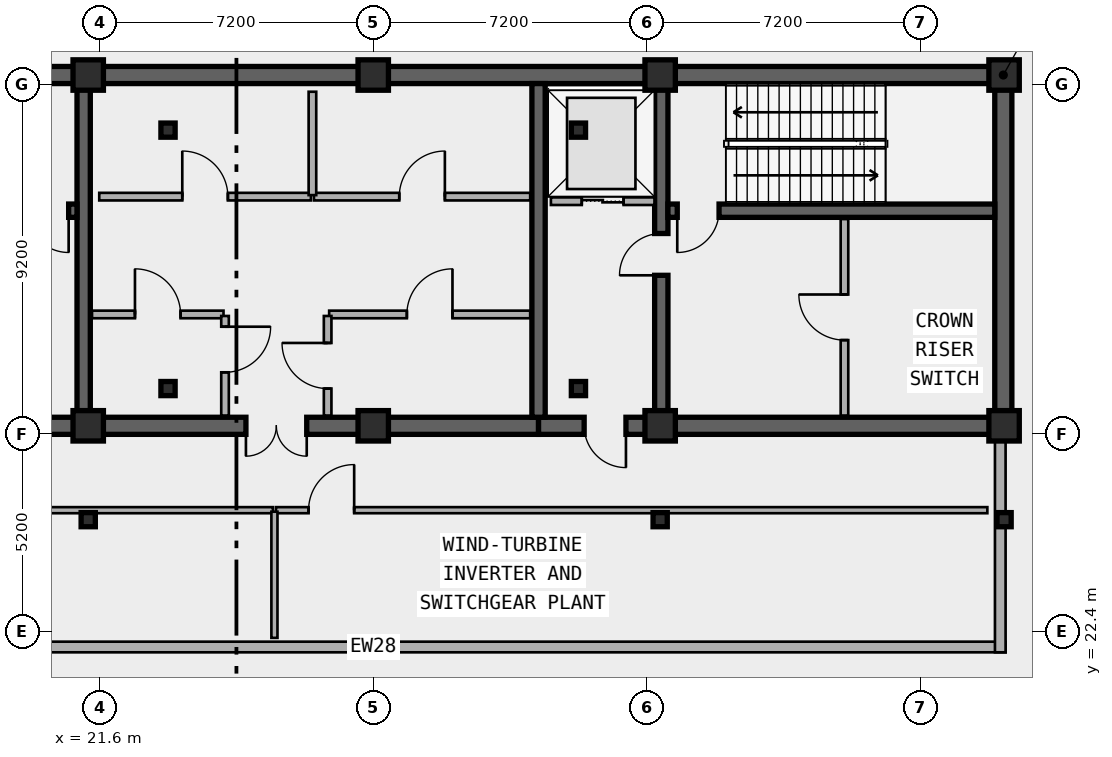
"""IFC4 building model, lengths in metres.
Left out: names, types, materials, properties, quantities, classifications, styles, units other than length and angle.
Written with IfcOpenShell. Run it as: python <this file> out.ifc"""

import sys

from ifc_helpers import new_model, si_unit, direction, frame, frame_2d, origin, origin_2d, place, context, subcontext, project, spatial, rectangle, i_section, extrude, element, fill, save


model = new_model("IFC4")
c1 = context("Model", 3, precision=1e-05, world=origin(), true_north=direction((0.0, 1.0)))
c2 = subcontext(c1, "Body", "Model", "MODEL_VIEW")
j1 = project(units=[si_unit("LENGTHUNIT", "METRE"), si_unit("PLANEANGLEUNIT", "RADIAN")], contexts=[c1])
p1 = place(None, origin())
s1 = spatial("IfcSite", under=j1, at=p1, CompositionType="ELEMENT")
p2 = place(p1, origin())
s2 = spatial("IfcBuilding", under=s1, at=p2, CompositionType="ELEMENT")
p3 = place(p2, frame((0.0, 0.0, 280.6)))
s3 = spatial("IfcBuildingStorey", under=s2, at=p3, CompositionType="ELEMENT", Elevation=280.6)
p4 = place(p3, frame((12.15, 37.05, 0.0), z_axis=(0.0, 0.0, 1.0), x_axis=(1.0, 0.0, 0.0)))
e1 = element("IfcWall", 1, at=p4, inside=s3, PredefinedType="SHEAR", context=c2, shape_type="SweptSolid", body=[
    extrude(rectangle(XDim=33.23, YDim=0.45, at=frame_2d((16.615, 0.0))), origin(), (0.0, 0.0, 1.0), 6.0),
])
p5 = place(p3, frame((21.18, 27.82, 0.0), z_axis=(0.0, 0.0, 1.0), x_axis=(-1.0, 0.0, 0.0)))
e2 = element("IfcWall", 2, at=p5, inside=s3, PredefinedType="SHEAR", context=c2, shape_type="SweptSolid", body=[
    extrude(rectangle(XDim=9.03, YDim=0.45, at=frame_2d((4.515, 0.0))), origin(), (0.0, 0.0, 1.0), 6.0),
])
p6 = place(p5, frame((2.68, 0.0, 0.0)))
e3 = element("IfcOpeningElement", 3, at=p6, cuts=e2, PredefinedType="OPENING", context=c2, shape_type="SweptSolid", body=[
    extrude(rectangle(XDim=1.1, YDim=2.15, at=frame_2d((0.55, 1.075))), frame((0.0, 0.235, 0.0), z_axis=(0.0, -1.0, 0.0), x_axis=(1.0, 0.0, 0.0)), (0.0, 0.0, 1.0), 0.47),
])
p7 = place(p3, frame((33.15, 27.82, 0.0), z_axis=(0.0, 0.0, 1.0), x_axis=(-1.0, 0.0, 0.0)))
e4 = element("IfcWall", 4, at=p7, inside=s3, PredefinedType="SHEAR", context=c2, shape_type="SweptSolid", body=[
    extrude(rectangle(XDim=11.97, YDim=0.45, at=frame_2d((5.985, 0.0))), origin(), (0.0, 0.0, 1.0), 6.0),
])
p8 = place(p7, frame((6.1, 0.0, 0.0)))
e5 = element("IfcOpeningElement", 5, at=p8, cuts=e4, PredefinedType="OPENING", context=c2, shape_type="SweptSolid", body=[
    extrude(rectangle(XDim=1.6, YDim=2.2, at=frame_2d((0.8, 1.1))), frame((0.0, 0.235, 0.0), z_axis=(0.0, -1.0, 0.0), x_axis=(1.0, 0.0, 0.0)), (0.0, 0.0, 1.0), 0.47),
])
p9 = place(p3, frame((45.38, 27.82, 0.0), z_axis=(0.0, 0.0, 1.0), x_axis=(-1.0, 0.0, 0.0)))
e6 = element("IfcWall", 6, at=p9, inside=s3, PredefinedType="SHEAR", context=c2, shape_type="SweptSolid", body=[
    extrude(rectangle(XDim=12.23, YDim=0.45, at=frame_2d((6.115, 0.0))), origin(), (0.0, 0.0, 1.0), 6.0),
])
p10 = place(p9, frame((9.93, 0.0, 0.0)))
e7 = element("IfcOpeningElement", 7, at=p10, cuts=e6, PredefinedType="OPENING", context=c2, shape_type="SweptSolid", body=[
    extrude(rectangle(XDim=1.1, YDim=2.15, at=frame_2d((0.55, 1.075))), frame((0.0, 0.235, 0.0), z_axis=(0.0, -1.0, 0.0), x_axis=(1.0, 0.0, 0.0)), (0.0, 0.0, 1.0), 0.47),
])
p11 = place(p3, frame((45.38, 28.045, 0.0), z_axis=(0.0, 0.0, 1.0), x_axis=(0.0, 1.0, 0.0)))
e8 = element("IfcWall", 8, at=p11, inside=s3, PredefinedType="SHEAR", context=c2, shape_type="SweptSolid", body=[
    extrude(rectangle(XDim=8.78, YDim=0.45, at=frame_2d((4.39, 0.0))), origin(), (0.0, 0.0, 1.0), 6.0),
])
for number, where, z_axis, x_axis in (
    (9, (21.18, 28.045, 0.0), (0.0, 0.0, 1.0), (0.0, 1.0, 0.0)),
    (10, (33.15, 28.045, 0.0), (0.0, 0.0, 1.0), (0.0, 1.0, 0.0)),
):
    element("IfcWall", number, at=place(p3, frame(where, z_axis=z_axis, x_axis=x_axis)), inside=s3, PredefinedType="SHEAR", context=c2, shape_type="SweptSolid", body=[
        extrude(rectangle(XDim=8.78, YDim=0.35, at=frame_2d((4.39, 0.0))), origin(), (0.0, 0.0, 1.0), 6.0),
    ])
p12 = place(p3, frame((36.38, 28.045, 0.0), z_axis=(0.0, 0.0, 1.0), x_axis=(0.0, 1.0, 0.0)))
e11 = element("IfcWall", 11, at=p12, inside=s3, PredefinedType="SHEAR", context=c2, shape_type="SweptSolid", body=[
    extrude(rectangle(XDim=8.78, YDim=0.35, at=frame_2d((4.39, 0.0))), origin(), (0.0, 0.0, 1.0), 6.0),
])
p13 = place(p12, frame((3.735, 0.0, 0.0)))
e12 = element("IfcOpeningElement", 12, at=p13, cuts=e11, PredefinedType="OPENING", context=c2, shape_type="SweptSolid", body=[
    extrude(rectangle(XDim=1.1, YDim=2.15, at=frame_2d((0.55, 1.075))), frame((0.0, 0.185, 0.0), z_axis=(0.0, -1.0, 0.0), x_axis=(1.0, 0.0, 0.0)), (0.0, 0.0, 1.0), 0.37),
])
p14 = place(p3, frame((21.005, 33.48, 0.0), z_axis=(0.0, 0.0, 1.0), x_axis=(-1.0, 0.0, 0.0)))
e13 = element("IfcWall", 13, at=p14, inside=s3, PredefinedType="SHEAR", context=c2, shape_type="SweptSolid", body=[
    extrude(rectangle(XDim=8.63, YDim=0.35, at=frame_2d((4.315, 0.0))), origin(), (0.0, 0.0, 1.0), 6.0),
])
p15 = place(p14, frame((0.22, 0.0, 0.0)))
e14 = element("IfcOpeningElement", 14, at=p15, cuts=e13, PredefinedType="OPENING", context=c2, shape_type="SweptSolid", body=[
    extrude(rectangle(XDim=1.1, YDim=2.15, at=frame_2d((0.55, 1.075))), frame((0.0, 0.185, 0.0), z_axis=(0.0, -1.0, 0.0), x_axis=(1.0, 0.0, 0.0)), (0.0, 0.0, 1.0), 0.37),
])
p16 = place(p3, frame((45.155, 33.48, 0.0), z_axis=(0.0, 0.0, 1.0), x_axis=(-1.0, 0.0, 0.0)))
e15 = element("IfcWall", 15, at=p16, inside=s3, PredefinedType="SHEAR", context=c2, shape_type="SweptSolid", body=[
    extrude(rectangle(XDim=8.6, YDim=0.35, at=frame_2d((4.3, 0.0))), origin(), (0.0, 0.0, 1.0), 6.0),
])
p17 = place(p16, frame((7.255, 0.0, 0.0)))
e16 = element("IfcOpeningElement", 16, at=p17, cuts=e15, PredefinedType="OPENING", context=c2, shape_type="SweptSolid", body=[
    extrude(rectangle(XDim=1.1, YDim=2.15, at=frame_2d((0.55, 1.075))), frame((0.0, 0.185, 0.0), z_axis=(0.0, -1.0, 0.0), x_axis=(1.0, 0.0, 0.0)), (0.0, 0.0, 1.0), 0.37),
])
for number, where, z_axis, x_axis in (
    (17, (23.4, 28.8, 0.0), (0.0, 0.0, 1.0), (1.0, 0.0, 0.0)),
    (18, (34.2, 28.8, 0.0), (0.0, 0.0, 1.0), (1.0, 0.0, 0.0)),
    (19, (34.2, 35.6, 0.0), (0.0, 0.0, 1.0), (1.0, 0.0, 0.0)),
    (20, (23.4, 35.6, 0.0), (0.0, 0.0, 1.0), (1.0, 0.0, 0.0)),
):
    element("IfcColumn", number, at=place(p3, frame(where, z_axis=z_axis, x_axis=x_axis)), inside=s3, PredefinedType="COLUMN", context=c2, shape_type="SweptSolid", body=[
        extrude(i_section(OverallWidth=0.374, OverallDepth=0.372, WebThickness=0.017, FlangeThickness=0.027, FilletRadius=0.015, at=origin_2d()), origin(), (0.0, 0.0, 1.0), 6.0),
    ])
for number, where, z_axis, x_axis in (
    (21, (21.3, 27.82, 0.0), (0.0, 0.0, 1.0), (1.0, 0.0, 0.0)),
    (22, (21.3, 37.05, 0.0), (0.0, 0.0, 1.0), (1.0, 0.0, 0.0)),
    (23, (28.8, 27.82, 0.0), (0.0, 0.0, 1.0), (1.0, 0.0, 0.0)),
    (24, (28.8, 37.05, 0.0), (0.0, 0.0, 1.0), (1.0, 0.0, 0.0)),
    (25, (36.35, 27.82, 0.0), (0.0, 0.0, 1.0), (1.0, 0.0, 0.0)),
    (26, (36.35, 37.05, 0.0), (0.0, 0.0, 1.0), (1.0, 0.0, 0.0)),
    (27, (45.4, 27.82, 0.0), (0.0, 0.0, 1.0), (1.0, 0.0, 0.0)),
    (28, (45.4, 37.05, 0.0), (0.0, 0.0, 1.0), (1.0, 0.0, 0.0)),
):
    element("IfcColumn", number, at=place(p3, frame(where, z_axis=z_axis, x_axis=x_axis)), inside=s3, PredefinedType="COLUMN", context=c2, shape_type="SweptSolid", body=[
        extrude(rectangle(XDim=0.8, YDim=0.8, at=origin_2d()), origin(), (0.0, 0.0, 1.0), 6.0),
    ])
for number, where, z_axis, x_axis in (
    (29, (21.3, 25.35, 0.0), (0.0, 0.0, 1.0), (1.0, 0.0, 0.0)),
    (30, (36.35, 25.35, 0.0), (0.0, 0.0, 1.0), (1.0, 0.0, 0.0)),
    (31, (45.4, 25.35, 0.0), (0.0, 0.0, 1.0), (1.0, 0.0, 0.0)),
):
    element("IfcColumn", number, at=place(p3, frame(where, z_axis=z_axis, x_axis=x_axis)), inside=s3, PredefinedType="COLUMN", context=c2, shape_type="SweptSolid", body=[
        extrude(i_section(OverallWidth=0.374, OverallDepth=0.372, WebThickness=0.017, FlangeThickness=0.027, FilletRadius=0.015, at=origin_2d()), origin(), (0.0, 0.0, 1.0), 6.0),
    ])
p18 = place(p3, frame((45.44, 22.0, 0.0), z_axis=(0.0, 0.0, 1.0), x_axis=(-1.0, 0.0, 0.0)))
e32 = element("IfcWall", 32, at=p18, inside=s3, PredefinedType="SOLIDWALL", context=c2, shape_type="SweptSolid", body=[
    extrude(rectangle(XDim=33.28, YDim=0.28, at=frame_2d((16.64, 0.0))), origin(), (0.0, 0.0, 1.0), 5.7),
])
p19 = place(p18, frame((25.64, 0.0, 0.0)))
e33 = element("IfcOpeningElement", 33, at=p19, cuts=e32, PredefinedType="OPENING", context=c2, shape_type="SweptSolid", body=[
    extrude(rectangle(XDim=1.6, YDim=2.2, at=frame_2d((0.8, 1.1))), frame((0.0, 0.15, 0.0), z_axis=(0.0, -1.0, 0.0), x_axis=(1.0, 0.0, 0.0)), (0.0, 0.0, 1.0), 0.3),
])
p20 = place(p3, frame((45.3, 27.55, 0.0), z_axis=(0.0, 0.0, 1.0), x_axis=(0.0, -1.0, 0.0)))
e34 = element("IfcWall", 34, at=p20, inside=s3, PredefinedType="SOLIDWALL", context=c2, shape_type="SweptSolid", body=[
    extrude(rectangle(XDim=5.69, YDim=0.28, at=frame_2d((2.845, 0.0))), origin(), (0.0, 0.0, 1.0), 5.18),
])
p21 = place(p3, frame((33.475, 33.73, 0.0), z_axis=(0.0, 0.0, 1.0), x_axis=(1.0, 0.0, 0.0)))
e35 = element("IfcWall", 35, at=p21, inside=s3, PredefinedType="PARTITIONING", context=c2, shape_type="SweptSolid", body=[
    extrude(rectangle(XDim=2.725, YDim=0.2, at=frame_2d((1.362, 0.0))), origin(), (0.0, 0.0, 1.0), 4.77),
])
p22 = place(p21, frame((0.812, 0.0, 0.0)))
e36 = element("IfcOpeningElement", 36, at=p22, cuts=e35, PredefinedType="OPENING", context=c2, shape_type="SweptSolid", body=[
    extrude(rectangle(XDim=1.1, YDim=2.15, at=frame_2d((0.55, 1.075))), frame((0.0, 0.11, 0.0), z_axis=(0.0, -1.0, 0.0), x_axis=(1.0, 0.0, 0.0)), (0.0, 0.0, 1.0), 0.22),
])
p23 = place(p3, frame((41.2, 28.09, 0.0), z_axis=(0.0, 0.0, 1.0), x_axis=(0.0, 1.0, 0.0)))
e37 = element("IfcWall", 37, at=p23, inside=s3, PredefinedType="PARTITIONING", context=c2, shape_type="SweptSolid", body=[
    extrude(rectangle(XDim=5.17, YDim=0.2, at=frame_2d((2.585, 0.0))), origin(), (0.0, 0.0, 1.0), 5.7),
])
p24 = place(p23, frame((1.985, 0.0, 0.0)))
e38 = element("IfcOpeningElement", 38, at=p24, cuts=e37, PredefinedType="OPENING", context=c2, shape_type="SweptSolid", body=[
    extrude(rectangle(XDim=1.2, YDim=2.15, at=frame_2d((0.6, 1.075))), frame((0.0, 0.11, 0.0), z_axis=(0.0, -1.0, 0.0), x_axis=(1.0, 0.0, 0.0)), (0.0, 0.0, 1.0), 0.22),
])
p25 = place(p3, frame((21.4, 30.75, 0.0), z_axis=(0.0, 0.0, 1.0), x_axis=(1.0, 0.0, 0.0)))
e39 = element("IfcWall", 39, at=p25, inside=s3, PredefinedType="PARTITIONING", context=c2, shape_type="SweptSolid", body=[
    extrude(rectangle(XDim=3.46, YDim=0.2, at=frame_2d((1.73, 0.0))), origin(), (0.0, 0.0, 1.0), 4.77),
])
p26 = place(p25, frame((1.13, 0.0, 0.0)))
e40 = element("IfcOpeningElement", 40, at=p26, cuts=e39, PredefinedType="OPENING", context=c2, shape_type="SweptSolid", body=[
    extrude(rectangle(XDim=1.2, YDim=2.15, at=frame_2d((0.6, 1.075))), frame((0.0, 0.11, 0.0), z_axis=(0.0, -1.0, 0.0), x_axis=(1.0, 0.0, 0.0)), (0.0, 0.0, 1.0), 0.22),
])
p27 = place(p3, frame((27.64, 30.75, 0.0), z_axis=(0.0, 0.0, 1.0), x_axis=(1.0, 0.0, 0.0)))
e41 = element("IfcWall", 41, at=p27, inside=s3, PredefinedType="PARTITIONING", context=c2, shape_type="SweptSolid", body=[
    extrude(rectangle(XDim=5.29, YDim=0.2, at=frame_2d((2.645, 0.0))), origin(), (0.0, 0.0, 1.0), 4.77),
])
p28 = place(p27, frame((2.045, 0.0, 0.0)))
e42 = element("IfcOpeningElement", 42, at=p28, cuts=e41, PredefinedType="OPENING", context=c2, shape_type="SweptSolid", body=[
    extrude(rectangle(XDim=1.2, YDim=2.15, at=frame_2d((0.6, 1.075))), frame((0.0, 0.11, 0.0), z_axis=(0.0, -1.0, 0.0), x_axis=(1.0, 0.0, 0.0)), (0.0, 0.0, 1.0), 0.22),
])
p29 = place(p3, frame((21.59, 33.85, 0.0), z_axis=(0.0, 0.0, 1.0), x_axis=(1.0, 0.0, 0.0)))
e43 = element("IfcWall", 43, at=p29, inside=s3, PredefinedType="PARTITIONING", context=c2, shape_type="SweptSolid", body=[
    extrude(rectangle(XDim=5.57, YDim=0.2, at=frame_2d((2.785, 0.0))), origin(), (0.0, 0.0, 1.0), 4.77),
])
p30 = place(p29, frame((2.185, 0.0, 0.0)))
e44 = element("IfcOpeningElement", 44, at=p30, cuts=e43, PredefinedType="OPENING", context=c2, shape_type="SweptSolid", body=[
    extrude(rectangle(XDim=1.2, YDim=2.15, at=frame_2d((0.6, 1.075))), frame((0.0, 0.11, 0.0), z_axis=(0.0, -1.0, 0.0), x_axis=(1.0, 0.0, 0.0)), (0.0, 0.0, 1.0), 0.22),
])
p31 = place(p3, frame((27.24, 33.85, 0.0), z_axis=(0.0, 0.0, 1.0), x_axis=(1.0, 0.0, 0.0)))
e45 = element("IfcWall", 45, at=p31, inside=s3, PredefinedType="PARTITIONING", context=c2, shape_type="SweptSolid", body=[
    extrude(rectangle(XDim=5.69, YDim=0.2, at=frame_2d((2.845, 0.0))), origin(), (0.0, 0.0, 1.0), 4.77),
])
p32 = place(p31, frame((2.245, 0.0, 0.0)))
e46 = element("IfcOpeningElement", 46, at=p32, cuts=e45, PredefinedType="OPENING", context=c2, shape_type="SweptSolid", body=[
    extrude(rectangle(XDim=1.2, YDim=2.15, at=frame_2d((0.6, 1.075))), frame((0.0, 0.11, 0.0), z_axis=(0.0, -1.0, 0.0), x_axis=(1.0, 0.0, 0.0)), (0.0, 0.0, 1.0), 0.22),
])
p33 = place(p3, frame((24.9, 30.71, 0.0), z_axis=(0.0, 0.0, 1.0), x_axis=(0.0, -1.0, 0.0)))
e47 = element("IfcWall", 47, at=p33, inside=s3, PredefinedType="PARTITIONING", context=c2, shape_type="SweptSolid", body=[
    extrude(rectangle(XDim=2.62, YDim=0.2, at=frame_2d((1.31, 0.0))), origin(), (0.0, 0.0, 1.0), 5.7),
])
p34 = place(p33, frame((0.282, 0.0, 0.0)))
e48 = element("IfcOpeningElement", 48, at=p34, cuts=e47, PredefinedType="OPENING", context=c2, shape_type="SweptSolid", body=[
    extrude(rectangle(XDim=1.2, YDim=2.15, at=frame_2d((0.6, 1.075))), frame((0.0, 0.11, 0.0), z_axis=(0.0, -1.0, 0.0), x_axis=(1.0, 0.0, 0.0)), (0.0, 0.0, 1.0), 0.22),
])
p35 = place(p3, frame((27.6, 28.09, 0.0), z_axis=(0.0, 0.0, 1.0), x_axis=(0.0, 1.0, 0.0)))
e49 = element("IfcWall", 49, at=p35, inside=s3, PredefinedType="PARTITIONING", context=c2, shape_type="SweptSolid", body=[
    extrude(rectangle(XDim=2.62, YDim=0.2, at=frame_2d((1.31, 0.0))), origin(), (0.0, 0.0, 1.0), 5.7),
])
p36 = place(p35, frame((0.71, 0.0, 0.0)))
e50 = element("IfcOpeningElement", 50, at=p36, cuts=e49, PredefinedType="OPENING", context=c2, shape_type="SweptSolid", body=[
    extrude(rectangle(XDim=1.2, YDim=2.15, at=frame_2d((0.6, 1.075))), frame((0.0, 0.11, 0.0), z_axis=(0.0, -1.0, 0.0), x_axis=(1.0, 0.0, 0.0)), (0.0, 0.0, 1.0), 0.22),
])
p37 = place(p3, frame((27.2, 33.89, 0.0), z_axis=(0.0, 0.0, 1.0), x_axis=(0.0, 1.0, 0.0)))
e51 = element("IfcWall", 51, at=p37, inside=s3, PredefinedType="PARTITIONING", context=c2, shape_type="SweptSolid", body=[
    extrude(rectangle(XDim=2.72, YDim=0.2, at=frame_2d((1.36, 0.0))), origin(), (0.0, 0.0, 1.0), 5.7),
])
p38 = place(p3, frame((12.64, 25.6, 0.0), z_axis=(0.0, 0.0, 1.0), x_axis=(1.0, 0.0, 0.0)))
e52 = element("IfcWall", 52, at=p38, inside=s3, PredefinedType="PARTITIONING", context=c2, shape_type="SweptSolid", body=[
    extrude(rectangle(XDim=13.52, YDim=0.16, at=frame_2d((6.76, 0.0))), origin(), (0.0, 0.0, 1.0), 5.18),
])
p39 = place(p38, frame((6.16, 0.0, 0.0)))
e53 = element("IfcOpeningElement", 53, at=p39, cuts=e52, PredefinedType="OPENING", context=c2, shape_type="SweptSolid", body=[
    extrude(rectangle(XDim=1.2, YDim=2.15, at=frame_2d((0.6, 1.075))), frame((0.0, 0.09, 0.0), z_axis=(0.0, -1.0, 0.0), x_axis=(1.0, 0.0, 0.0)), (0.0, 0.0, 1.0), 0.18),
])
p40 = place(p3, frame((26.24, 25.6, 0.0), z_axis=(0.0, 0.0, 1.0), x_axis=(1.0, 0.0, 0.0)))
e54 = element("IfcWall", 54, at=p40, inside=s3, PredefinedType="PARTITIONING", context=c2, shape_type="SweptSolid", body=[
    extrude(rectangle(XDim=18.72, YDim=0.16, at=frame_2d((9.36, 0.0))), origin(), (0.0, 0.0, 1.0), 5.18),
])
p41 = place(p40, frame((0.858, 0.0, 0.0)))
e55 = element("IfcOpeningElement", 55, at=p41, cuts=e54, PredefinedType="OPENING", context=c2, shape_type="SweptSolid", body=[
    extrude(rectangle(XDim=1.2, YDim=2.15, at=frame_2d((0.6, 1.075))), frame((0.0, 0.09, 0.0), z_axis=(0.0, -1.0, 0.0), x_axis=(1.0, 0.0, 0.0)), (0.0, 0.0, 1.0), 0.18),
])
p42 = place(p3, frame((26.2, 22.24, 0.0), z_axis=(0.0, 0.0, 1.0), x_axis=(0.0, 1.0, 0.0)))
e56 = element("IfcWall", 56, at=p42, inside=s3, PredefinedType="PARTITIONING", context=c2, shape_type="SweptSolid", body=[
    extrude(rectangle(XDim=3.32, YDim=0.16, at=frame_2d((1.66, 0.0))), origin(), (0.0, 0.0, 1.0), 5.32),
])
p43 = place(p22, origin())
e57 = element("IfcDoor", 57, at=p43, inside=s3, OperationType="DOUBLE_DOOR_SLIDING", PredefinedType="DOOR", context=c2, shape_type="SweptSolid", body=[
    extrude(rectangle(XDim=1.1, YDim=2.15, at=frame_2d((0.55, 1.075))), frame((0.0, 0.025, 0.0), z_axis=(0.0, -1.0, 0.0), x_axis=(1.0, 0.0, 0.0)), (0.0, 0.0, 1.0), 0.05),
])
fill(e36, e57)
p44 = place(p15, origin())
e58 = element("IfcDoor", 58, at=p44, inside=s3, OperationType="SINGLE_SWING_LEFT", PredefinedType="DOOR", context=c2, shape_type="SweptSolid", body=[
    extrude(rectangle(XDim=1.1, YDim=2.15, at=frame_2d((0.55, 1.075))), frame((0.0, 0.025, 0.0), z_axis=(0.0, -1.0, 0.0), x_axis=(1.0, 0.0, 0.0)), (0.0, 0.0, 1.0), 0.05),
])
fill(e14, e58)
p45 = place(p17, origin())
e59 = element("IfcDoor", 59, at=p45, inside=s3, OperationType="SINGLE_SWING_RIGHT", PredefinedType="DOOR", context=c2, shape_type="SweptSolid", body=[
    extrude(rectangle(XDim=1.1, YDim=2.15, at=frame_2d((0.55, 1.075))), frame((0.0, 0.025, 0.0), z_axis=(0.0, -1.0, 0.0), x_axis=(1.0, 0.0, 0.0)), (0.0, 0.0, 1.0), 0.05),
])
fill(e16, e59)
p46 = place(p13, origin())
e60 = element("IfcDoor", 60, at=p46, inside=s3, OperationType="SINGLE_SWING_LEFT", PredefinedType="DOOR", context=c2, shape_type="SweptSolid", body=[
    extrude(rectangle(XDim=1.1, YDim=2.15, at=frame_2d((0.55, 1.075))), frame((0.0, 0.025, 0.0), z_axis=(0.0, -1.0, 0.0), x_axis=(1.0, 0.0, 0.0)), (0.0, 0.0, 1.0), 0.05),
])
fill(e12, e60)
p47 = place(p10, origin())
e61 = element("IfcDoor", 61, at=p47, inside=s3, OperationType="SINGLE_SWING_LEFT", PredefinedType="DOOR", context=c2, shape_type="SweptSolid", body=[
    extrude(rectangle(XDim=1.1, YDim=2.15, at=frame_2d((0.55, 1.075))), frame((0.0, 0.025, 0.0), z_axis=(0.0, -1.0, 0.0), x_axis=(1.0, 0.0, 0.0)), (0.0, 0.0, 1.0), 0.05),
])
fill(e7, e61)
p48 = place(p8, origin())
e62 = element("IfcDoor", 62, at=p48, inside=s3, OperationType="SINGLE_SWING_LEFT", PredefinedType="DOOR", context=c2, shape_type="SweptSolid", body=[
    extrude(rectangle(XDim=1.6, YDim=2.2, at=frame_2d((0.8, 1.1))), frame((0.0, 0.025, 0.0), z_axis=(0.0, -1.0, 0.0), x_axis=(1.0, 0.0, 0.0)), (0.0, 0.0, 1.0), 0.05),
])
fill(e5, e62)
p49 = place(p24, origin())
e63 = element("IfcDoor", 63, at=p49, inside=s3, OperationType="SINGLE_SWING_RIGHT", PredefinedType="DOOR", context=c2, shape_type="SweptSolid", body=[
    extrude(rectangle(XDim=1.2, YDim=2.15, at=frame_2d((0.6, 1.075))), frame((0.0, 0.025, 0.0), z_axis=(0.0, -1.0, 0.0), x_axis=(1.0, 0.0, 0.0)), (0.0, 0.0, 1.0), 0.05),
])
fill(e38, e63)
p50 = place(p26, origin())
e64 = element("IfcDoor", 64, at=p50, inside=s3, OperationType="SINGLE_SWING_LEFT", PredefinedType="DOOR", context=c2, shape_type="SweptSolid", body=[
    extrude(rectangle(XDim=1.2, YDim=2.15, at=frame_2d((0.6, 1.075))), frame((0.0, 0.025, 0.0), z_axis=(0.0, -1.0, 0.0), x_axis=(1.0, 0.0, 0.0)), (0.0, 0.0, 1.0), 0.05),
])
fill(e40, e64)
p51 = place(p28, origin())
e65 = element("IfcDoor", 65, at=p51, inside=s3, OperationType="SINGLE_SWING_RIGHT", PredefinedType="DOOR", context=c2, shape_type="SweptSolid", body=[
    extrude(rectangle(XDim=1.2, YDim=2.15, at=frame_2d((0.6, 1.075))), frame((0.0, 0.025, 0.0), z_axis=(0.0, -1.0, 0.0), x_axis=(1.0, 0.0, 0.0)), (0.0, 0.0, 1.0), 0.05),
])
fill(e42, e65)
p52 = place(p30, origin())
e66 = element("IfcDoor", 66, at=p52, inside=s3, OperationType="SINGLE_SWING_LEFT", PredefinedType="DOOR", context=c2, shape_type="SweptSolid", body=[
    extrude(rectangle(XDim=1.2, YDim=2.15, at=frame_2d((0.6, 1.075))), frame((0.0, 0.025, 0.0), z_axis=(0.0, -1.0, 0.0), x_axis=(1.0, 0.0, 0.0)), (0.0, 0.0, 1.0), 0.05),
])
fill(e44, e66)
p53 = place(p32, origin())
e67 = element("IfcDoor", 67, at=p53, inside=s3, OperationType="SINGLE_SWING_RIGHT", PredefinedType="DOOR", context=c2, shape_type="SweptSolid", body=[
    extrude(rectangle(XDim=1.2, YDim=2.15, at=frame_2d((0.6, 1.075))), frame((0.0, 0.025, 0.0), z_axis=(0.0, -1.0, 0.0), x_axis=(1.0, 0.0, 0.0)), (0.0, 0.0, 1.0), 0.05),
])
fill(e46, e67)
p54 = place(p34, origin())
e68 = element("IfcDoor", 68, at=p54, inside=s3, OperationType="SINGLE_SWING_LEFT", PredefinedType="DOOR", context=c2, shape_type="SweptSolid", body=[
    extrude(rectangle(XDim=1.2, YDim=2.15, at=frame_2d((0.6, 1.075))), frame((0.0, 0.025, 0.0), z_axis=(0.0, -1.0, 0.0), x_axis=(1.0, 0.0, 0.0)), (0.0, 0.0, 1.0), 0.05),
])
fill(e48, e68)
p55 = place(p36, origin())
e69 = element("IfcDoor", 69, at=p55, inside=s3, OperationType="SINGLE_SWING_RIGHT", PredefinedType="DOOR", context=c2, shape_type="SweptSolid", body=[
    extrude(rectangle(XDim=1.2, YDim=2.15, at=frame_2d((0.6, 1.075))), frame((0.0, 0.025, 0.0), z_axis=(0.0, -1.0, 0.0), x_axis=(1.0, 0.0, 0.0)), (0.0, 0.0, 1.0), 0.05),
])
fill(e50, e69)
p56 = place(p41, origin())
e70 = element("IfcDoor", 70, at=p56, inside=s3, OperationType="SINGLE_SWING_RIGHT", PredefinedType="DOOR", context=c2, shape_type="SweptSolid", body=[
    extrude(rectangle(XDim=1.2, YDim=2.15, at=frame_2d((0.6, 1.075))), frame((0.0, 0.025, 0.0), z_axis=(0.0, -1.0, 0.0), x_axis=(1.0, 0.0, 0.0)), (0.0, 0.0, 1.0), 0.05),
])
fill(e55, e70)
save(model, sys.argv[1])
